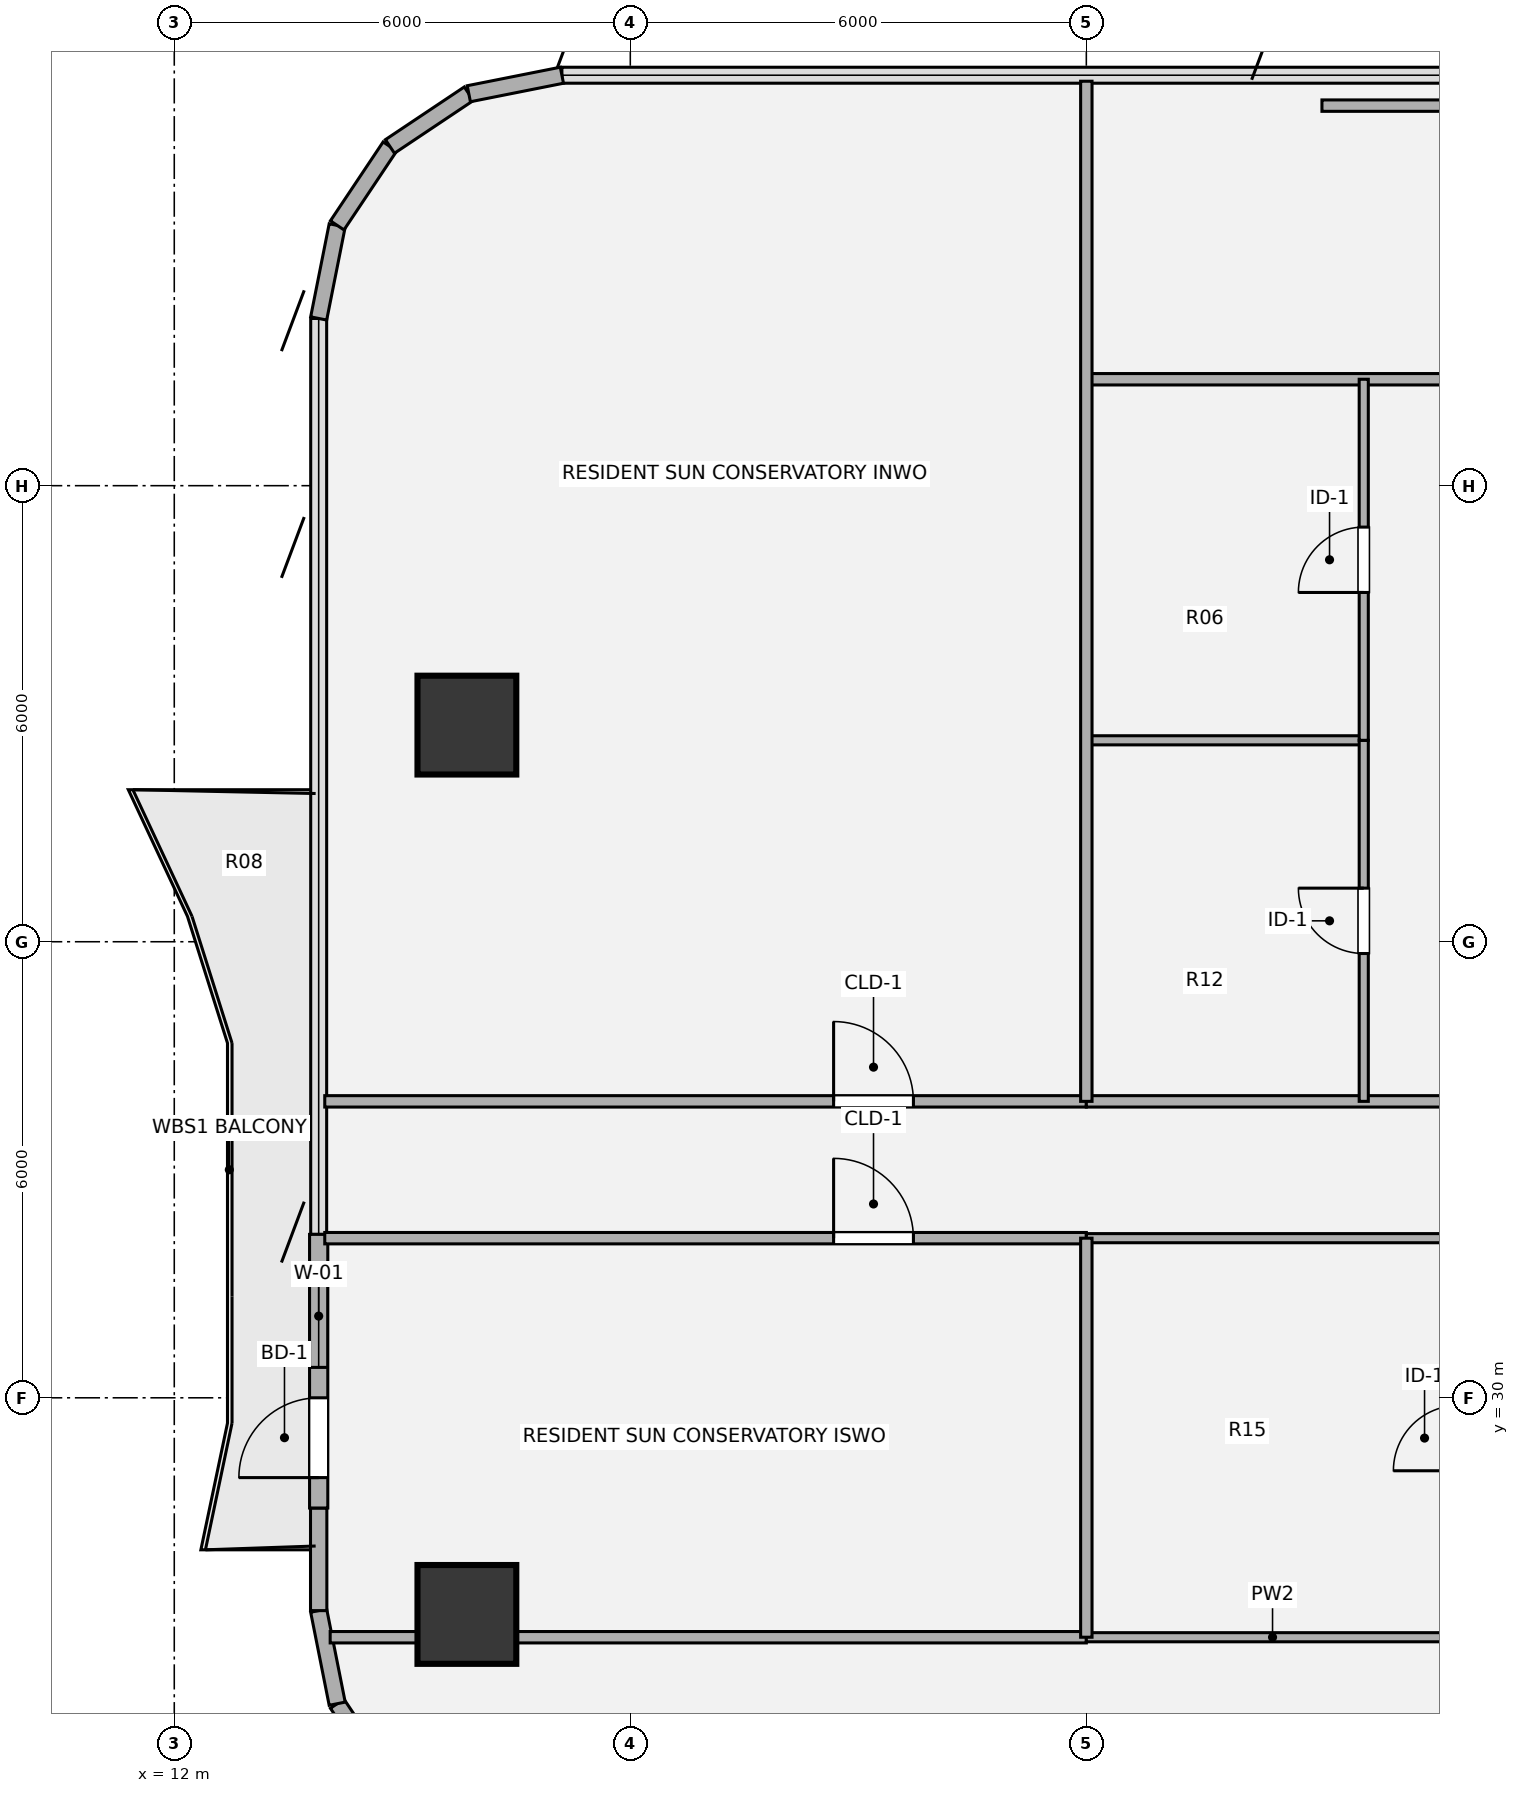
"""IFC4 building model, lengths in metres.
Left out: names, types, materials, properties, quantities, classifications, styles, units other than length and angle.
Written with IfcOpenShell. Run it as: python <this file> out.ifc"""

import sys

from ifc_helpers import new_model, si_unit, direction, frame, frame_2d, origin, origin_2d, place, context, subcontext, project, spatial, rectangle, hollow_circle, extrude, source, transform, mapped, element, fill, save


model = new_model("IFC4")
c1 = context("Model", 3, precision=1e-05, world=origin(), true_north=direction((0.0, 1.0)))
c2 = subcontext(c1, "Body", "Model", "MODEL_VIEW")
j1 = project(units=[si_unit("LENGTHUNIT", "METRE"), si_unit("PLANEANGLEUNIT", "RADIAN")], contexts=[c1])
p1 = place(None, origin())
s1 = spatial("IfcSite", under=j1, at=p1, CompositionType="ELEMENT")
p2 = place(p1, origin())
s2 = spatial("IfcBuilding", under=s1, at=p2, CompositionType="ELEMENT")
p3 = place(p2, frame((0.0, 0.0, 93.6)))
s3 = spatial("IfcBuildingStorey", under=s2, at=p3, CompositionType="ELEMENT", Elevation=93.6)
m1 = source(origin(), c2, "Body", "SweptSolid", [
    extrude(hollow_circle(Radius=0.65, WallThickness=0.045, at=origin_2d()), origin(), (0.0, 0.0, 1.0), 3.78),
])
for number, where, z_axis, x_axis in (
    (1, (15.85, 27.15, 0.0), (0.0, 0.0, 1.0), (1.0, 0.0, 0.0)),
    (2, (15.85, 38.85, 0.0), (0.0, 0.0, 1.0), (1.0, 0.0, 0.0)),
):
    element("IfcColumn", number, at=place(p3, frame(where, z_axis=z_axis, x_axis=x_axis)), inside=s3, PredefinedType="COLUMN", context=c2, shape_type="MappedRepresentation", body=[
        mapped(m1, transform((0.0, 0.0, 0.0), x_axis=(1.0, 0.0, 0.0), y_axis=(0.0, 1.0, 0.0), z_axis=(0.0, 0.0, 1.0), scale=1.0)),
    ])
for number, where, z_axis, x_axis in (
    (3, (14.837, 24.937, 0.0), (0.0, 0.0, 1.0), (-0.556, 0.831, 0.0)),
    (4, (14.144, 25.975, 0.0), (0.0, 0.0, 1.0), (-0.195, 0.981, 0.0)),
):
    element("IfcWall", number, at=place(p3, frame(where, z_axis=z_axis, x_axis=x_axis)), inside=s3, PredefinedType="SOLIDWALL", context=c2, shape_type="SweptSolid", body=[
        extrude(rectangle(XDim=1.249, YDim=0.215, at=frame_2d((0.624, 0.0))), origin(), (0.0, 0.0, 1.0), 3.53),
    ])
p4 = place(p3, frame((13.9, 27.2, 0.0), z_axis=(0.0, 0.0, 1.0), x_axis=(0.0, 1.0, 0.0)))
e5 = element("IfcWall", 5, at=p4, inside=s3, PredefinedType="SOLIDWALL", context=c2, shape_type="SweptSolid", body=[
    extrude(rectangle(XDim=1.35, YDim=0.215, at=frame_2d((0.675, 0.0))), origin(), (0.0, 0.0, 1.0), 3.53),
])
p5 = place(p3, frame((13.9, 28.55, 0.0), z_axis=(0.0, 0.0, 1.0), x_axis=(0.0, 1.0, 0.0)))
e6 = element("IfcWall", 6, at=p5, inside=s3, PredefinedType="SOLIDWALL", context=c2, shape_type="SweptSolid", body=[
    extrude(rectangle(XDim=3.6, YDim=0.24, at=frame_2d((1.8, 0.0))), origin(), (0.0, 0.0, 1.0), 3.53),
])
p6 = place(p5, frame((0.4, 0.0, 0.0)))
e7 = element("IfcOpeningElement", 7, at=p6, cuts=e6, PredefinedType="OPENING", context=c2, shape_type="SweptSolid", body=[
    extrude(rectangle(XDim=1.05, YDim=2.15, at=origin_2d()), frame((0.525, 0.13, 1.075), z_axis=(0.0, -1.0, 0.0), x_axis=(1.0, 0.0, 0.0)), (0.0, 0.0, 1.0), 0.26),
])
p7 = place(p5, frame((1.85, 0.0, 0.85)))
e8 = element("IfcOpeningElement", 8, at=p7, cuts=e6, PredefinedType="OPENING", context=c2, shape_type="SweptSolid", body=[
    extrude(rectangle(XDim=1.35, YDim=1.35, at=origin_2d()), frame((0.675, 0.13, 0.675), z_axis=(0.0, -1.0, 0.0), x_axis=(1.0, 0.0, 0.0)), (0.0, 0.0, 1.0), 0.26),
])
for number, where, z_axis, x_axis in (
    (9, (13.9, 44.2, 0.0), (0.0, 0.0, 1.0), (0.195, 0.981, 0.0)),
    (10, (14.144, 45.425, 0.0), (0.0, 0.0, 1.0), (0.556, 0.831, 0.0)),
    (11, (14.837, 46.463, 0.0), (0.0, 0.0, 1.0), (0.831, 0.556, 0.0)),
    (12, (15.875, 47.156, 0.0), (0.0, 0.0, 1.0), (0.981, 0.195, 0.0)),
):
    element("IfcWall", number, at=place(p3, frame(where, z_axis=z_axis, x_axis=x_axis)), inside=s3, PredefinedType="SOLIDWALL", context=c2, shape_type="SweptSolid", body=[
        extrude(rectangle(XDim=1.249, YDim=0.215, at=frame_2d((0.624, 0.0))), origin(), (0.0, 0.0, 1.0), 3.53),
    ])
p8 = place(p3, frame((14.051, 26.85, 0.0), z_axis=(0.0, 0.0, 1.0), x_axis=(1.0, 0.0, 0.0)))
e13 = element("IfcWall", 13, at=p8, inside=s3, PredefinedType="PARTITIONING", context=c2, shape_type="SweptSolid", body=[
    extrude(rectangle(XDim=9.949, YDim=0.15, at=frame_2d((4.974, 0.0))), origin(), (0.0, 0.0, 1.0), 3.055),
])
p9 = place(p3, frame((24.0, 26.85, 0.0), z_axis=(0.0, 0.0, 1.0), x_axis=(1.0, 0.0, 0.0)))
e14 = element("IfcWall", 14, at=p9, inside=s3, PredefinedType="PARTITIONING", context=c2, shape_type="SweptSolid", body=[
    extrude(rectangle(XDim=4.9, YDim=0.12, at=frame_2d((2.45, 0.0))), origin(), (0.0, 0.0, 1.0), 3.055),
])
p10 = place(p3, frame((13.98, 32.1, 0.0), z_axis=(0.0, 0.0, 1.0), x_axis=(1.0, 0.0, 0.0)))
e15 = element("IfcWall", 15, at=p10, inside=s3, PredefinedType="PARTITIONING", context=c2, shape_type="SweptSolid", body=[
    extrude(rectangle(XDim=10.02, YDim=0.15, at=frame_2d((5.01, 0.0))), origin(), (0.0, 0.0, 1.0), 2.982),
])
p11 = place(p10, frame((6.695, 0.0, 0.0)))
e16 = element("IfcOpeningElement", 16, at=p11, cuts=e15, PredefinedType="OPENING", context=c2, shape_type="SweptSolid", body=[
    extrude(rectangle(XDim=1.05, YDim=2.1, at=origin_2d()), frame((0.525, 0.085, 1.05), z_axis=(0.0, -1.0, 0.0), x_axis=(1.0, 0.0, 0.0)), (0.0, 0.0, 1.0), 0.17),
])
p12 = place(p3, frame((24.0, 32.1, 0.0), z_axis=(0.0, 0.0, 1.0), x_axis=(1.0, 0.0, 0.0)))
e17 = element("IfcWall", 17, at=p12, inside=s3, PredefinedType="PARTITIONING", context=c2, shape_type="SweptSolid", body=[
    extrude(rectangle(XDim=4.9, YDim=0.12, at=frame_2d((2.45, 0.0))), origin(), (0.0, 0.0, 1.0), 2.982),
])
p13 = place(p3, frame((13.98, 33.9, 0.0), z_axis=(0.0, 0.0, 1.0), x_axis=(1.0, 0.0, 0.0)))
e18 = element("IfcWall", 18, at=p13, inside=s3, PredefinedType="PARTITIONING", context=c2, shape_type="SweptSolid", body=[
    extrude(rectangle(XDim=10.02, YDim=0.15, at=frame_2d((5.01, 0.0))), origin(), (0.0, 0.0, 1.0), 2.982),
])
p14 = place(p13, frame((6.695, 0.0, 0.0)))
e19 = element("IfcOpeningElement", 19, at=p14, cuts=e18, PredefinedType="OPENING", context=c2, shape_type="SweptSolid", body=[
    extrude(rectangle(XDim=1.05, YDim=2.1, at=origin_2d()), frame((0.525, 0.085, 1.05), z_axis=(0.0, -1.0, 0.0), x_axis=(1.0, 0.0, 0.0)), (0.0, 0.0, 1.0), 0.17),
])
p15 = place(p3, frame((24.0, 33.9, 0.0), z_axis=(0.0, 0.0, 1.0), x_axis=(1.0, 0.0, 0.0)))
e20 = element("IfcWall", 20, at=p15, inside=s3, PredefinedType="PARTITIONING", context=c2, shape_type="SweptSolid", body=[
    extrude(rectangle(XDim=11.1, YDim=0.15, at=frame_2d((5.55, 0.0))), origin(), (0.0, 0.0, 1.0), 2.982),
])
p16 = place(p3, frame((24.0, 38.65, 0.0), z_axis=(0.0, 0.0, 1.0), x_axis=(1.0, 0.0, 0.0)))
e21 = element("IfcWall", 21, at=p16, inside=s3, PredefinedType="PARTITIONING", context=c2, shape_type="SweptSolid", body=[
    extrude(rectangle(XDim=3.65, YDim=0.12, at=frame_2d((1.825, 0.0))), origin(), (0.0, 0.0, 1.0), 2.903),
])
p17 = place(p3, frame((24.0, 43.4, 0.0), z_axis=(0.0, 0.0, 1.0), x_axis=(1.0, 0.0, 0.0)))
e22 = element("IfcWall", 22, at=p17, inside=s3, PredefinedType="PARTITIONING", context=c2, shape_type="SweptSolid", body=[
    extrude(rectangle(XDim=11.1, YDim=0.15, at=frame_2d((5.55, 0.0))), origin(), (0.0, 0.0, 1.0), 3.308),
])
p18 = place(p3, frame((27.1, 47.0, 0.0), z_axis=(0.0, 0.0, 1.0), x_axis=(1.0, 0.0, 0.0)))
e23 = element("IfcWall", 23, at=p18, inside=s3, PredefinedType="PARTITIONING", context=c2, shape_type="SweptSolid", body=[
    extrude(rectangle(XDim=17.8, YDim=0.15, at=frame_2d((8.9, 0.0))), origin(), (0.0, 0.0, 1.0), 3.308),
])
p19 = place(p18, frame((8.375, 0.0, 0.0)))
e24 = element("IfcOpeningElement", 24, at=p19, cuts=e23, PredefinedType="OPENING", context=c2, shape_type="SweptSolid", body=[
    extrude(rectangle(XDim=1.05, YDim=2.1, at=origin_2d()), frame((0.525, 0.085, 1.05), z_axis=(0.0, -1.0, 0.0), x_axis=(1.0, 0.0, 0.0)), (0.0, 0.0, 1.0), 0.17),
])
p20 = place(p3, frame((24.0, 26.85, 0.0), z_axis=(0.0, 0.0, 1.0), x_axis=(0.0, 1.0, 0.0)))
e25 = element("IfcWall", 25, at=p20, inside=s3, PredefinedType="PARTITIONING", context=c2, shape_type="SweptSolid", body=[
    extrude(rectangle(XDim=5.25, YDim=0.15, at=frame_2d((2.625, 0.0))), origin(), (0.0, 0.0, 1.0), 3.5),
])
p21 = place(p3, frame((24.0, 33.9, 0.0), z_axis=(0.0, 0.0, 1.0), x_axis=(0.0, 1.0, 0.0)))
e26 = element("IfcWall", 26, at=p21, inside=s3, PredefinedType="PARTITIONING", context=c2, shape_type="SweptSolid", body=[
    extrude(rectangle(XDim=13.421, YDim=0.15, at=frame_2d((6.71, 0.0))), origin(), (0.0, 0.0, 1.0), 3.5),
])
p22 = place(p3, frame((27.65, 33.9, 0.0), z_axis=(0.0, 0.0, 1.0), x_axis=(0.0, 1.0, 0.0)))
e27 = element("IfcWall", 27, at=p22, inside=s3, PredefinedType="PARTITIONING", context=c2, shape_type="SweptSolid", body=[
    extrude(rectangle(XDim=4.75, YDim=0.12, at=frame_2d((2.375, 0.0))), origin(), (0.0, 0.0, 1.0), 3.5),
])
p23 = place(p22, frame((1.945, 0.0, 0.0)))
e28 = element("IfcOpeningElement", 28, at=p23, cuts=e27, PredefinedType="OPENING", context=c2, shape_type="SweptSolid", body=[
    extrude(rectangle(XDim=0.86, YDim=2.1, at=origin_2d()), frame((0.43, 0.07, 1.05), z_axis=(0.0, -1.0, 0.0), x_axis=(1.0, 0.0, 0.0)), (0.0, 0.0, 1.0), 0.14),
])
p24 = place(p3, frame((27.65, 38.65, 0.0), z_axis=(0.0, 0.0, 1.0), x_axis=(0.0, 1.0, 0.0)))
e29 = element("IfcWall", 29, at=p24, inside=s3, PredefinedType="PARTITIONING", context=c2, shape_type="SweptSolid", body=[
    extrude(rectangle(XDim=4.75, YDim=0.12, at=frame_2d((2.375, 0.0))), origin(), (0.0, 0.0, 1.0), 3.5),
])
p25 = place(p24, frame((1.945, 0.0, 0.0)))
e30 = element("IfcOpeningElement", 30, at=p25, cuts=e29, PredefinedType="OPENING", context=c2, shape_type="SweptSolid", body=[
    extrude(rectangle(XDim=0.86, YDim=2.1, at=origin_2d()), frame((0.43, 0.07, 1.05), z_axis=(0.0, -1.0, 0.0), x_axis=(1.0, 0.0, 0.0)), (0.0, 0.0, 1.0), 0.14),
])
m2 = source(origin(), c2, "Body", "SweptSolid", [
    extrude(rectangle(XDim=1.05, YDim=2.15, at=origin_2d()), frame((0.525, 0.025, 1.075), z_axis=(0.0, -1.0, 0.0), x_axis=(1.0, 0.0, 0.0)), (0.0, 0.0, 1.0), 0.05),
])
p26 = place(p6, origin())
e31 = element("IfcDoor", 31, at=p26, inside=s3, OperationType="SINGLE_SWING_LEFT", PredefinedType="DOOR", context=c2, shape_type="MappedRepresentation", body=[
    mapped(m2, transform((0.0, 0.0, 0.0), x_axis=(1.0, 0.0, 0.0), y_axis=(0.0, 1.0, 0.0), z_axis=(0.0, 0.0, 1.0), scale=1.0)),
])
fill(e7, e31)
m3 = source(origin(), c2, "Body", "SweptSolid", [
    extrude(rectangle(XDim=1.35, YDim=1.35, at=origin_2d()), frame((0.675, 0.03, 0.675), z_axis=(0.0, -1.0, 0.0), x_axis=(1.0, 0.0, 0.0)), (0.0, 0.0, 1.0), 0.06),
])
p27 = place(p7, origin())
e32 = element("IfcWindow", 32, at=p27, inside=s3, PartitioningType="SINGLE_PANEL", PredefinedType="WINDOW", context=c2, shape_type="MappedRepresentation", body=[
    mapped(m3, transform((0.0, 0.0, 0.0), x_axis=(1.0, 0.0, 0.0), y_axis=(0.0, 1.0, 0.0), z_axis=(0.0, 0.0, 1.0), scale=1.0)),
])
fill(e8, e32)
m4 = source(origin(), c2, "Body", "SweptSolid", [
    extrude(rectangle(XDim=1.05, YDim=2.1, at=origin_2d()), frame((0.525, 0.025, 1.05), z_axis=(0.0, -1.0, 0.0), x_axis=(1.0, 0.0, 0.0)), (0.0, 0.0, 1.0), 0.05),
])
p28 = place(p11, origin())
e33 = element("IfcDoor", 33, at=p28, inside=s3, OperationType="SINGLE_SWING_LEFT", PredefinedType="DOOR", context=c2, shape_type="MappedRepresentation", body=[
    mapped(m4, transform((0.0, 0.0, 0.0), x_axis=(1.0, 0.0, 0.0), y_axis=(0.0, 1.0, 0.0), z_axis=(0.0, 0.0, 1.0), scale=1.0)),
])
fill(e16, e33)
p29 = place(p14, origin())
e34 = element("IfcDoor", 34, at=p29, inside=s3, OperationType="SINGLE_SWING_LEFT", PredefinedType="DOOR", context=c2, shape_type="MappedRepresentation", body=[
    mapped(m4, transform((0.0, 0.0, 0.0), x_axis=(1.0, 0.0, 0.0), y_axis=(0.0, 1.0, 0.0), z_axis=(0.0, 0.0, 1.0), scale=1.0)),
])
fill(e19, e34)
m5 = source(origin(), c2, "Body", "SweptSolid", [
    extrude(rectangle(XDim=0.86, YDim=2.1, at=origin_2d()), frame((0.43, 0.025, 1.05), z_axis=(0.0, -1.0, 0.0), x_axis=(1.0, 0.0, 0.0)), (0.0, 0.0, 1.0), 0.05),
])
p30 = place(p23, origin())
e35 = element("IfcDoor", 35, at=p30, inside=s3, OperationType="SINGLE_SWING_RIGHT", PredefinedType="DOOR", context=c2, shape_type="MappedRepresentation", body=[
    mapped(m5, transform((0.0, 0.0, 0.0), x_axis=(1.0, 0.0, 0.0), y_axis=(0.0, 1.0, 0.0), z_axis=(0.0, 0.0, 1.0), scale=1.0)),
])
fill(e28, e35)
p31 = place(p25, origin())
e36 = element("IfcDoor", 36, at=p31, inside=s3, OperationType="SINGLE_SWING_LEFT", PredefinedType="DOOR", context=c2, shape_type="MappedRepresentation", body=[
    mapped(m5, transform((0.0, 0.0, 0.0), x_axis=(1.0, 0.0, 0.0), y_axis=(0.0, 1.0, 0.0), z_axis=(0.0, 0.0, 1.0), scale=1.0)),
])
fill(e30, e36)
save(model, sys.argv[1])
